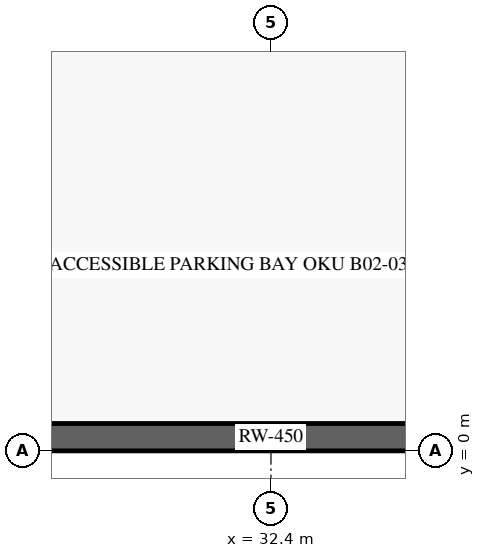
"""IFC4 building model, lengths in metres.
Left out: names, types, materials, properties, quantities, classifications, styles, units other than length and angle.
Written with IfcOpenShell. Run it as: python <this file> out.ifc"""

import sys

from ifc_helpers import new_model, si_unit, direction, frame, frame_2d, origin, place, context, subcontext, project, spatial, rectangle, extrude, element, save


model = new_model("IFC4")
c1 = context("Model", 3, precision=1e-05, world=origin(), true_north=direction((0.0, 1.0)))
c2 = subcontext(c1, "Body", "Model", "MODEL_VIEW")
j1 = project(units=[si_unit("LENGTHUNIT", "METRE"), si_unit("PLANEANGLEUNIT", "RADIAN")], contexts=[c1])
p1 = place(None, origin())
s1 = spatial("IfcSite", under=j1, at=p1, CompositionType="ELEMENT")
p2 = place(p1, origin())
s2 = spatial("IfcBuilding", under=s1, at=p2, CompositionType="ELEMENT")
p3 = place(p2, frame((0.0, 0.0, -7.2)))
s3 = spatial("IfcBuildingStorey", under=s2, at=p3, CompositionType="ELEMENT", Elevation=-7.2)
p4 = place(p3, frame((0.225, 0.225, -0.36), z_axis=(0.0, 0.0, 1.0), x_axis=(1.0, 0.0, 0.0)))
e1 = element("IfcWall", 1, at=p4, inside=s3, PredefinedType="USERDEFINED", context=c2, shape_type="SweptSolid", body=[
    extrude(rectangle(XDim=64.35, YDim=0.45, at=frame_2d((32.175, 0.0))), origin(), (0.0, 0.0, 1.0), 3.598),
])
save(model, sys.argv[1])
